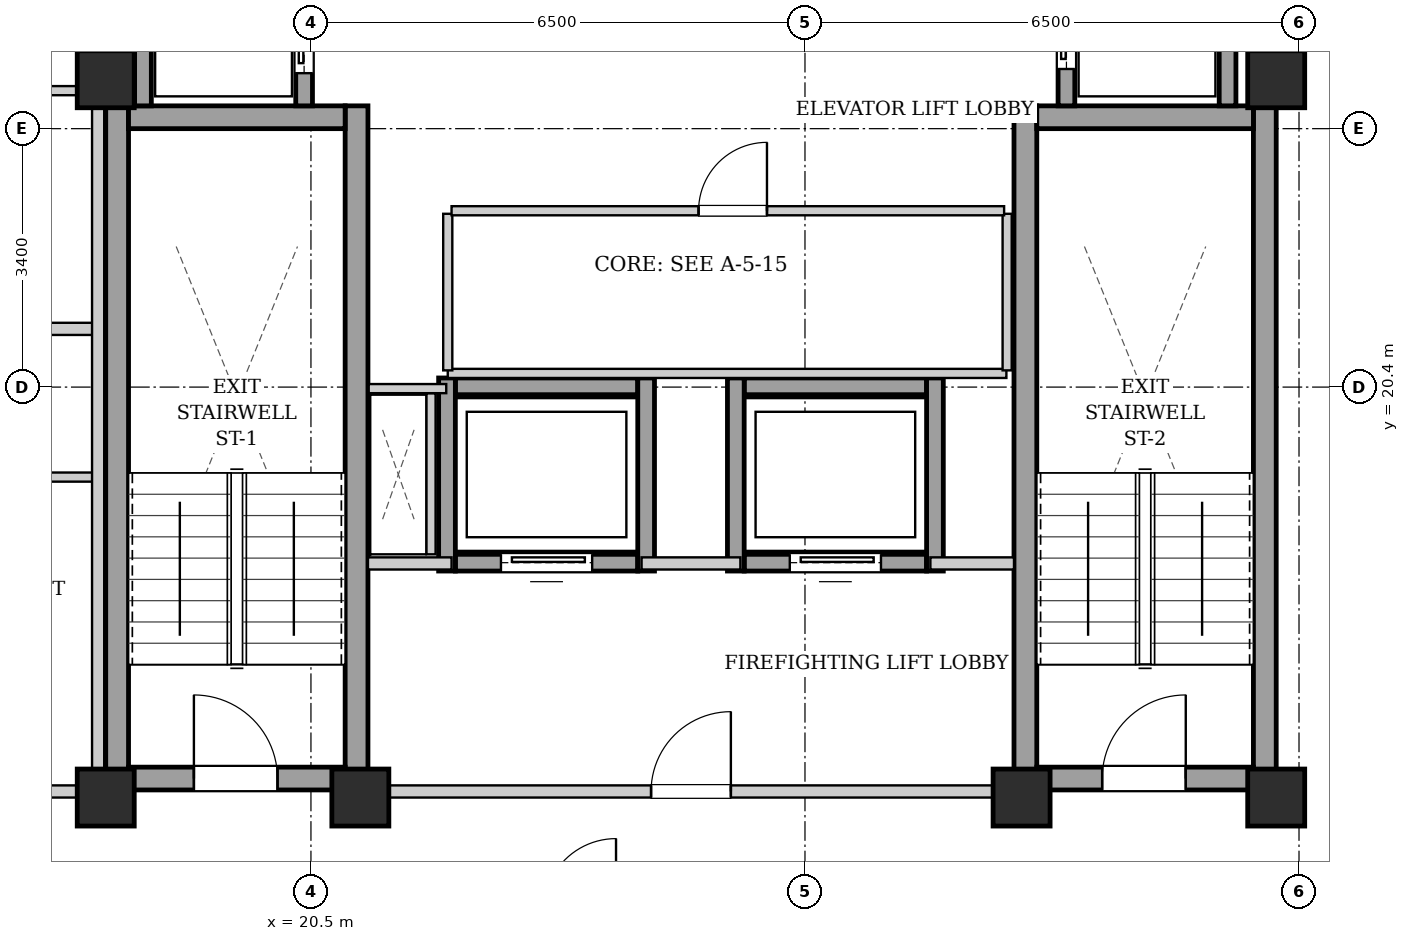
"""IFC4 building model, lengths in metres.
Left out: names, types, materials, properties, quantities, classifications, styles, units other than length and angle.
Written with IfcOpenShell. Run it as: python <this file> out.ifc"""

import sys

from ifc_helpers import new_model, si_unit, direction, frame, frame_2d, origin, origin_2d, place, context, subcontext, project, spatial, rectangle, extrude, element, fill, save


model = new_model("IFC4")
c1 = context("Model", 3, precision=1e-05, world=origin(), true_north=direction((0.0, 1.0)))
c2 = subcontext(c1, "Body", "Model", "MODEL_VIEW")
j1 = project(units=[si_unit("LENGTHUNIT", "METRE"), si_unit("PLANEANGLEUNIT", "RADIAN")], contexts=[c1])
p1 = place(None, origin())
s1 = spatial("IfcSite", under=j1, at=p1, CompositionType="ELEMENT")
p2 = place(p1, origin())
s2 = spatial("IfcBuilding", under=s1, at=p2, CompositionType="ELEMENT")
p3 = place(p2, frame((0.0, 0.0, 244.5)))
s3 = spatial("IfcBuildingStorey", under=s2, at=p3, CompositionType="ELEMENT", Elevation=244.5)
for number, where, z_axis, x_axis in (
    (1, (17.8, 15.0, 0.0), (0.0, 0.0, 1.0), (1.0, 0.0, 0.0)),
    (2, (21.15, 15.0, 0.0), (0.0, 0.0, 1.0), (1.0, 0.0, 0.0)),
    (3, (29.85, 15.0, 0.0), (0.0, 0.0, 1.0), (1.0, 0.0, 0.0)),
    (4, (33.2, 15.0, 0.0), (0.0, 0.0, 1.0), (1.0, 0.0, 0.0)),
    (5, (17.8, 24.45, 0.0), (0.0, 0.0, 1.0), (1.0, 0.0, 0.0)),
    (6, (33.2, 24.45, 0.0), (0.0, 0.0, 1.0), (1.0, 0.0, 0.0)),
):
    element("IfcColumn", number, at=place(p3, frame(where, z_axis=z_axis, x_axis=x_axis)), inside=s3, PredefinedType="COLUMN", context=c2, shape_type="SweptSolid", body=[
        extrude(rectangle(XDim=0.75, YDim=0.75, at=origin_2d()), origin(), (0.0, 0.0, 1.0), 3.4),
    ])
for number, where, z_axis, x_axis in (
    (7, (17.95, 15.1, 0.0), (0.0, 0.0, 1.0), (0.0, 1.0, 0.0)),
    (8, (21.1, 15.1, 0.0), (0.0, 0.0, 1.0), (0.0, 1.0, 0.0)),
):
    element("IfcWall", number, at=place(p3, frame(where, z_axis=z_axis, x_axis=x_axis)), inside=s3, PredefinedType="SHEAR", context=c2, shape_type="SweptSolid", body=[
        extrude(rectangle(XDim=9.0, YDim=0.3, at=frame_2d((4.5, 0.0))), origin(), (0.0, 0.0, 1.0), 3.14),
    ])
p4 = place(p3, frame((18.1, 23.95, 0.0), z_axis=(0.0, 0.0, 1.0), x_axis=(1.0, 0.0, 0.0)))
e9 = element("IfcWall", 9, at=p4, inside=s3, PredefinedType="SHEAR", context=c2, shape_type="SweptSolid", body=[
    extrude(rectangle(XDim=2.85, YDim=0.3, at=frame_2d((1.425, 0.0))), origin(), (0.0, 0.0, 1.0), 3.14),
])
p5 = place(p3, frame((18.1, 15.25, 0.0), z_axis=(0.0, 0.0, 1.0), x_axis=(1.0, 0.0, 0.0)))
e10 = element("IfcWall", 10, at=p5, inside=s3, PredefinedType="SHEAR", context=c2, shape_type="SweptSolid", body=[
    extrude(rectangle(XDim=2.85, YDim=0.3, at=frame_2d((1.425, 0.0))), origin(), (0.0, 0.0, 1.0), 3.14),
])
p6 = place(p5, frame((0.86, 0.0, 0.0)))
e11 = element("IfcOpeningElement", 11, at=p6, cuts=e10, PredefinedType="OPENING", context=c2, shape_type="SweptSolid", body=[
    extrude(rectangle(XDim=1.1, YDim=2.05, at=frame_2d((0.55, 1.025))), frame((0.0, 0.16, 0.0), z_axis=(0.0, -1.0, 0.0), x_axis=(1.0, 0.0, 0.0)), (0.0, 0.0, 1.0), 0.32),
])
for number, where, z_axis, x_axis in (
    (12, (29.9, 15.1, 0.0), (0.0, 0.0, 1.0), (0.0, 1.0, 0.0)),
    (13, (33.05, 15.1, 0.0), (0.0, 0.0, 1.0), (0.0, 1.0, 0.0)),
):
    element("IfcWall", number, at=place(p3, frame(where, z_axis=z_axis, x_axis=x_axis)), inside=s3, PredefinedType="SHEAR", context=c2, shape_type="SweptSolid", body=[
        extrude(rectangle(XDim=9.0, YDim=0.3, at=frame_2d((4.5, 0.0))), origin(), (0.0, 0.0, 1.0), 3.14),
    ])
p7 = place(p3, frame((30.05, 23.95, 0.0), z_axis=(0.0, 0.0, 1.0), x_axis=(1.0, 0.0, 0.0)))
e14 = element("IfcWall", 14, at=p7, inside=s3, PredefinedType="SHEAR", context=c2, shape_type="SweptSolid", body=[
    extrude(rectangle(XDim=2.85, YDim=0.3, at=frame_2d((1.425, 0.0))), origin(), (0.0, 0.0, 1.0), 3.14),
])
p8 = place(p3, frame((30.05, 15.25, 0.0), z_axis=(0.0, 0.0, 1.0), x_axis=(1.0, 0.0, 0.0)))
e15 = element("IfcWall", 15, at=p8, inside=s3, PredefinedType="SHEAR", context=c2, shape_type="SweptSolid", body=[
    extrude(rectangle(XDim=2.85, YDim=0.3, at=frame_2d((1.425, 0.0))), origin(), (0.0, 0.0, 1.0), 3.14),
])
p9 = place(p8, frame((0.86, 0.0, 0.0)))
e16 = element("IfcOpeningElement", 16, at=p9, cuts=e15, PredefinedType="OPENING", context=c2, shape_type="SweptSolid", body=[
    extrude(rectangle(XDim=1.1, YDim=2.05, at=frame_2d((0.55, 1.025))), frame((0.0, 0.16, 0.0), z_axis=(0.0, -1.0, 0.0), x_axis=(1.0, 0.0, 0.0)), (0.0, 0.0, 1.0), 0.32),
])
p10 = place(p3, frame((18.29, 24.1, 0.0), z_axis=(0.0, 0.0, 1.0), x_axis=(0.0, 1.0, 0.0)))
e17 = element("IfcWall", 17, at=p10, inside=s3, PredefinedType="SHEAR", context=c2, shape_type="SweptSolid", body=[
    extrude(rectangle(XDim=4.14, YDim=0.22, at=frame_2d((2.07, 0.0))), origin(), (0.0, 0.0, 1.0), 3.14),
])
p11 = place(p3, frame((20.41, 24.1, 0.0), z_axis=(0.0, 0.0, 1.0), x_axis=(0.0, 1.0, 0.0)))
e18 = element("IfcWall", 18, at=p11, inside=s3, PredefinedType="SHEAR", context=c2, shape_type="SweptSolid", body=[
    extrude(rectangle(XDim=1.96, YDim=0.22, at=frame_2d((0.98, 0.0))), origin(), (0.0, 0.0, 1.0), 3.14),
])
p12 = place(p11, frame((0.43, 0.0, 0.0)))
e19 = element("IfcOpeningElement", 19, at=p12, cuts=e18, PredefinedType="OPENING", context=c2, shape_type="SweptSolid", body=[
    extrude(rectangle(XDim=1.1, YDim=2.15, at=frame_2d((0.55, 1.075))), frame((0.0, 0.12, 0.0), z_axis=(0.0, -1.0, 0.0), x_axis=(1.0, 0.0, 0.0)), (0.0, 0.0, 1.0), 0.24),
])
p13 = place(p3, frame((30.44, 24.1, 0.0), z_axis=(0.0, 0.0, 1.0), x_axis=(0.0, 1.0, 0.0)))
e20 = element("IfcWall", 20, at=p13, inside=s3, PredefinedType="SHEAR", context=c2, shape_type="SweptSolid", body=[
    extrude(rectangle(XDim=2.07, YDim=0.22, at=frame_2d((1.035, 0.0))), origin(), (0.0, 0.0, 1.0), 3.14),
])
p14 = place(p13, frame((0.485, 0.0, 0.0)))
e21 = element("IfcOpeningElement", 21, at=p14, cuts=e20, PredefinedType="OPENING", context=c2, shape_type="SweptSolid", body=[
    extrude(rectangle(XDim=1.1, YDim=2.15, at=frame_2d((0.55, 1.075))), frame((0.0, 0.12, 0.0), z_axis=(0.0, -1.0, 0.0), x_axis=(1.0, 0.0, 0.0)), (0.0, 0.0, 1.0), 0.24),
])
p15 = place(p3, frame((32.56, 24.1, 0.0), z_axis=(0.0, 0.0, 1.0), x_axis=(0.0, 1.0, 0.0)))
e22 = element("IfcWall", 22, at=p15, inside=s3, PredefinedType="SHEAR", context=c2, shape_type="SweptSolid", body=[
    extrude(rectangle(XDim=2.07, YDim=0.22, at=frame_2d((1.035, 0.0))), origin(), (0.0, 0.0, 1.0), 3.14),
])
p16 = place(p3, frame((22.4, 18.09, 0.0), z_axis=(0.0, 0.0, 1.0), x_axis=(1.0, 0.0, 0.0)))
e23 = element("IfcWall", 23, at=p16, inside=s3, PredefinedType="SHEAR", context=c2, shape_type="SweptSolid", body=[
    extrude(rectangle(XDim=2.4, YDim=0.22, at=frame_2d((1.2, 0.0))), origin(), (0.0, 0.0, 1.0), 3.14),
])
p17 = place(p16, frame((0.6, 0.0, 0.0)))
e24 = element("IfcOpeningElement", 24, at=p17, cuts=e23, PredefinedType="OPENING", context=c2, shape_type="SweptSolid", body=[
    extrude(rectangle(XDim=1.2, YDim=2.15, at=frame_2d((0.6, 1.075))), frame((0.0, 0.12, 0.0), z_axis=(0.0, -1.0, 0.0), x_axis=(1.0, 0.0, 0.0)), (0.0, 0.0, 1.0), 0.24),
])
p18 = place(p3, frame((22.4, 20.41, 0.0), z_axis=(0.0, 0.0, 1.0), x_axis=(1.0, 0.0, 0.0)))
e25 = element("IfcWall", 25, at=p18, inside=s3, PredefinedType="SHEAR", context=c2, shape_type="SweptSolid", body=[
    extrude(rectangle(XDim=2.4, YDim=0.22, at=frame_2d((1.2, 0.0))), origin(), (0.0, 0.0, 1.0), 3.14),
])
for number, where, z_axis, x_axis in (
    (26, (22.29, 17.98, 0.0), (0.0, 0.0, 1.0), (0.0, 1.0, 0.0)),
    (27, (24.91, 17.98, 0.0), (0.0, 0.0, 1.0), (0.0, 1.0, 0.0)),
):
    element("IfcWall", number, at=place(p3, frame(where, z_axis=z_axis, x_axis=x_axis)), inside=s3, PredefinedType="SHEAR", context=c2, shape_type="SweptSolid", body=[
        extrude(rectangle(XDim=2.54, YDim=0.22, at=frame_2d((1.27, 0.0))), origin(), (0.0, 0.0, 1.0), 3.14),
    ])
p19 = place(p3, frame((26.2, 18.09, 0.0), z_axis=(0.0, 0.0, 1.0), x_axis=(1.0, 0.0, 0.0)))
e28 = element("IfcWall", 28, at=p19, inside=s3, PredefinedType="SHEAR", context=c2, shape_type="SweptSolid", body=[
    extrude(rectangle(XDim=2.4, YDim=0.22, at=frame_2d((1.2, 0.0))), origin(), (0.0, 0.0, 1.0), 3.14),
])
p20 = place(p19, frame((0.6, 0.0, 0.0)))
e29 = element("IfcOpeningElement", 29, at=p20, cuts=e28, PredefinedType="OPENING", context=c2, shape_type="SweptSolid", body=[
    extrude(rectangle(XDim=1.2, YDim=2.15, at=frame_2d((0.6, 1.075))), frame((0.0, 0.12, 0.0), z_axis=(0.0, -1.0, 0.0), x_axis=(1.0, 0.0, 0.0)), (0.0, 0.0, 1.0), 0.24),
])
p21 = place(p3, frame((26.2, 20.41, 0.0), z_axis=(0.0, 0.0, 1.0), x_axis=(1.0, 0.0, 0.0)))
e30 = element("IfcWall", 30, at=p21, inside=s3, PredefinedType="SHEAR", context=c2, shape_type="SweptSolid", body=[
    extrude(rectangle(XDim=2.4, YDim=0.22, at=frame_2d((1.2, 0.0))), origin(), (0.0, 0.0, 1.0), 3.14),
])
for number, where, z_axis, x_axis in (
    (31, (26.09, 17.98, 0.0), (0.0, 0.0, 1.0), (0.0, 1.0, 0.0)),
    (32, (28.71, 17.98, 0.0), (0.0, 0.0, 1.0), (0.0, 1.0, 0.0)),
):
    element("IfcWall", number, at=place(p3, frame(where, z_axis=z_axis, x_axis=x_axis)), inside=s3, PredefinedType="SHEAR", context=c2, shape_type="SweptSolid", body=[
        extrude(rectangle(XDim=2.54, YDim=0.22, at=frame_2d((1.27, 0.0))), origin(), (0.0, 0.0, 1.0), 3.14),
    ])
p22 = place(p3, frame((21.25, 15.08, 0.0), z_axis=(0.0, 0.0, 1.0), x_axis=(1.0, 0.0, 0.0)))
e33 = element("IfcWall", 33, at=p22, inside=s3, PredefinedType="PARTITIONING", context=c2, shape_type="SweptSolid", body=[
    extrude(rectangle(XDim=8.5, YDim=0.16, at=frame_2d((4.25, 0.0))), origin(), (0.0, 0.0, 1.0), 2.668),
])
p23 = place(p22, frame((3.725, 0.0, 0.0)))
e34 = element("IfcOpeningElement", 34, at=p23, cuts=e33, PredefinedType="OPENING", context=c2, shape_type="SweptSolid", body=[
    extrude(rectangle(XDim=1.05, YDim=2.05, at=frame_2d((0.525, 1.025))), frame((0.0, 0.09, 0.0), z_axis=(0.0, -1.0, 0.0), x_axis=(1.0, 0.0, 0.0)), (0.0, 0.0, 1.0), 0.18),
])
p24 = place(p3, frame((21.25, 18.08, 0.0), z_axis=(0.0, 0.0, 1.0), x_axis=(1.0, 0.0, 0.0)))
e35 = element("IfcWall", 35, at=p24, inside=s3, PredefinedType="PARTITIONING", context=c2, shape_type="SweptSolid", body=[
    extrude(rectangle(XDim=1.1, YDim=0.16, at=frame_2d((0.55, 0.0))), origin(), (0.0, 0.0, 1.0), 3.14),
])
p25 = place(p3, frame((24.85, 18.08, 0.0), z_axis=(0.0, 0.0, 1.0), x_axis=(1.0, 0.0, 0.0)))
e36 = element("IfcWall", 36, at=p25, inside=s3, PredefinedType="PARTITIONING", context=c2, shape_type="SweptSolid", body=[
    extrude(rectangle(XDim=1.3, YDim=0.16, at=frame_2d((0.65, 0.0))), origin(), (0.0, 0.0, 1.0), 3.14),
])
p26 = place(p3, frame((28.65, 18.08, 0.0), z_axis=(0.0, 0.0, 1.0), x_axis=(1.0, 0.0, 0.0)))
e37 = element("IfcWall", 37, at=p26, inside=s3, PredefinedType="PARTITIONING", context=c2, shape_type="SweptSolid", body=[
    extrude(rectangle(XDim=1.1, YDim=0.16, at=frame_2d((0.55, 0.0))), origin(), (0.0, 0.0, 1.0), 3.14),
])
for number, where, z_axis, x_axis in (
    (38, (17.88, 24.12, 0.0), (0.0, 0.0, 1.0), (0.0, 1.0, 0.0)),
    (39, (33.12, 24.12, 0.0), (0.0, 0.0, 1.0), (0.0, 1.0, 0.0)),
):
    element("IfcWall", number, at=place(p3, frame(where, z_axis=z_axis, x_axis=x_axis)), inside=s3, PredefinedType="PARTITIONING", context=c2, shape_type="SweptSolid", body=[
        extrude(rectangle(XDim=4.76, YDim=0.16, at=frame_2d((2.38, 0.0))), origin(), (0.0, 0.0, 1.0), 3.14),
    ])
p27 = place(p3, frame((22.08, 18.2, 0.0), z_axis=(0.0, 0.0, 1.0), x_axis=(0.0, 1.0, 0.0)))
e40 = element("IfcWall", 40, at=p27, inside=s3, PredefinedType="PARTITIONING", context=c2, shape_type="SweptSolid", body=[
    extrude(rectangle(XDim=2.12, YDim=0.12, at=frame_2d((1.06, 0.0))), origin(), (0.0, 0.0, 1.0), 3.14),
])
p28 = place(p3, frame((22.28, 20.38, 0.0), z_axis=(0.0, 0.0, 1.0), x_axis=(-1.0, 0.0, 0.0)))
e41 = element("IfcWall", 41, at=p28, inside=s3, PredefinedType="PARTITIONING", context=c2, shape_type="SweptSolid", body=[
    extrude(rectangle(XDim=1.02, YDim=0.12, at=frame_2d((0.51, 0.0))), origin(), (0.0, 0.0, 1.0), 3.14),
])
p29 = place(p3, frame((22.3, 20.58, 0.0), z_axis=(0.0, 0.0, 1.0), x_axis=(1.0, 0.0, 0.0)))
e42 = element("IfcWall", 42, at=p29, inside=s3, PredefinedType="PARTITIONING", context=c2, shape_type="SweptSolid", body=[
    extrude(rectangle(XDim=7.35, YDim=0.12, at=frame_2d((3.675, 0.0))), origin(), (0.0, 0.0, 1.0), 3.14),
])
for number, where, z_axis, x_axis in (
    (43, (22.3, 20.62, 0.0), (0.0, 0.0, 1.0), (0.0, 1.0, 0.0)),
    (44, (29.66, 20.62, 0.0), (0.0, 0.0, 1.0), (0.0, 1.0, 0.0)),
):
    element("IfcWall", number, at=place(p3, frame(where, z_axis=z_axis, x_axis=x_axis)), inside=s3, PredefinedType="PARTITIONING", context=c2, shape_type="SweptSolid", body=[
        extrude(rectangle(XDim=2.06, YDim=0.12, at=frame_2d((1.03, 0.0))), origin(), (0.0, 0.0, 1.0), 3.14),
    ])
p30 = place(p3, frame((22.35, 22.72, 0.0), z_axis=(0.0, 0.0, 1.0), x_axis=(1.0, 0.0, 0.0)))
e45 = element("IfcWall", 45, at=p30, inside=s3, PredefinedType="PARTITIONING", context=c2, shape_type="SweptSolid", body=[
    extrude(rectangle(XDim=7.27, YDim=0.12, at=frame_2d((3.635, 0.0))), origin(), (0.0, 0.0, 1.0), 3.14),
])
p31 = place(p30, frame((3.25, 0.0, 0.0)))
e46 = element("IfcOpeningElement", 46, at=p31, cuts=e45, PredefinedType="OPENING", context=c2, shape_type="SweptSolid", body=[
    extrude(rectangle(XDim=0.9, YDim=2.05, at=frame_2d((0.45, 1.025))), frame((0.0, 0.07, 0.0), z_axis=(0.0, -1.0, 0.0), x_axis=(1.0, 0.0, 0.0)), (0.0, 0.0, 1.0), 0.14),
])
p32 = place(p3, frame((10.88, 15.08, 0.0), z_axis=(0.0, 0.0, 1.0), x_axis=(1.0, 0.0, 0.0)))
e47 = element("IfcWall", 47, at=p32, inside=s3, PredefinedType="PARTITIONING", context=c2, shape_type="SweptSolid", body=[
    extrude(rectangle(XDim=6.88, YDim=0.16, at=frame_2d((3.44, 0.0))), origin(), (0.0, 0.0, 1.0), 2.668),
])
p33 = place(p32, frame((5.06, 0.0, 0.0)))
e48 = element("IfcOpeningElement", 48, at=p33, cuts=e47, PredefinedType="OPENING", context=c2, shape_type="SweptSolid", body=[
    extrude(rectangle(XDim=0.95, YDim=2.1, at=frame_2d((0.475, 1.05))), frame((0.0, 0.09, 0.0), z_axis=(0.0, -1.0, 0.0), x_axis=(1.0, 0.0, 0.0)), (0.0, 0.0, 1.0), 0.18),
])
p34 = place(p3, frame((10.88, 21.166, 0.0), z_axis=(0.0, 0.0, 1.0), x_axis=(1.0, 0.0, 0.0)))
e49 = element("IfcWall", 49, at=p34, inside=s3, PredefinedType="PARTITIONING", context=c2, shape_type="SweptSolid", body=[
    extrude(rectangle(XDim=6.76, YDim=0.16, at=frame_2d((3.38, 0.0))), origin(), (0.0, 0.0, 1.0), 3.14),
])
p35 = place(p3, frame((15.19, 19.216, 0.0), z_axis=(0.0, 0.0, 1.0), x_axis=(1.0, 0.0, 0.0)))
e50 = element("IfcWall", 50, at=p35, inside=s3, PredefinedType="PARTITIONING", context=c2, shape_type="SweptSolid", body=[
    extrude(rectangle(XDim=2.45, YDim=0.12, at=frame_2d((1.225, 0.0))), origin(), (0.0, 0.0, 1.0), 3.14),
])
p36 = place(p35, frame((0.795, 0.0, 0.0)))
e51 = element("IfcOpeningElement", 51, at=p36, cuts=e50, PredefinedType="OPENING", context=c2, shape_type="SweptSolid", body=[
    extrude(rectangle(XDim=0.86, YDim=2.05, at=frame_2d((0.43, 1.025))), frame((0.0, 0.07, 0.0), z_axis=(0.0, -1.0, 0.0), x_axis=(1.0, 0.0, 0.0)), (0.0, 0.0, 1.0), 0.14),
])
p37 = place(p3, frame((15.19, 24.3, 0.0), z_axis=(0.0, 0.0, 1.0), x_axis=(1.0, 0.0, 0.0)))
e52 = element("IfcWall", 52, at=p37, inside=s3, PredefinedType="PARTITIONING", context=c2, shape_type="SweptSolid", body=[
    extrude(rectangle(XDim=2.45, YDim=0.12, at=frame_2d((1.225, 0.0))), origin(), (0.0, 0.0, 1.0), 3.14),
])
p38 = place(p37, frame((0.795, 0.0, 0.0)))
e53 = element("IfcOpeningElement", 53, at=p38, cuts=e52, PredefinedType="OPENING", context=c2, shape_type="SweptSolid", body=[
    extrude(rectangle(XDim=0.86, YDim=2.05, at=frame_2d((0.43, 1.025))), frame((0.0, 0.07, 0.0), z_axis=(0.0, -1.0, 0.0), x_axis=(1.0, 0.0, 0.0)), (0.0, 0.0, 1.0), 0.14),
])
p39 = place(p3, frame((17.7, 15.02, 0.0), z_axis=(0.0, 0.0, 1.0), x_axis=(0.0, 1.0, 0.0)))
e54 = element("IfcWall", 54, at=p39, inside=s3, PredefinedType="PARTITIONING", context=c2, shape_type="SweptSolid", body=[
    extrude(rectangle(XDim=13.98, YDim=0.16, at=frame_2d((6.99, 0.0))), origin(), (0.0, 0.0, 1.0), 3.14),
])
p40 = place(p6, origin())
e55 = element("IfcDoor", 55, at=p40, inside=s3, OperationType="SINGLE_SWING_LEFT", PredefinedType="DOOR", context=c2, shape_type="SweptSolid", body=[
    extrude(rectangle(XDim=1.1, YDim=2.05, at=frame_2d((0.55, 1.025))), frame((0.0, 0.025, 0.0), z_axis=(0.0, -1.0, 0.0), x_axis=(1.0, 0.0, 0.0)), (0.0, 0.0, 1.0), 0.05),
])
fill(e11, e55)
p41 = place(p9, origin())
e56 = element("IfcDoor", 56, at=p41, inside=s3, OperationType="SINGLE_SWING_RIGHT", PredefinedType="DOOR", context=c2, shape_type="SweptSolid", body=[
    extrude(rectangle(XDim=1.1, YDim=2.05, at=frame_2d((0.55, 1.025))), frame((0.0, 0.025, 0.0), z_axis=(0.0, -1.0, 0.0), x_axis=(1.0, 0.0, 0.0)), (0.0, 0.0, 1.0), 0.05),
])
fill(e16, e56)
p42 = place(p12, origin())
e57 = element("IfcDoor", 57, at=p42, inside=s3, OperationType="SLIDING_TO_LEFT", PredefinedType="DOOR", context=c2, shape_type="SweptSolid", body=[
    extrude(rectangle(XDim=1.1, YDim=2.15, at=frame_2d((0.55, 1.075))), frame((0.0, 0.025, 0.0), z_axis=(0.0, -1.0, 0.0), x_axis=(1.0, 0.0, 0.0)), (0.0, 0.0, 1.0), 0.05),
])
fill(e19, e57)
p43 = place(p14, origin())
e58 = element("IfcDoor", 58, at=p43, inside=s3, OperationType="SLIDING_TO_LEFT", PredefinedType="DOOR", context=c2, shape_type="SweptSolid", body=[
    extrude(rectangle(XDim=1.1, YDim=2.15, at=frame_2d((0.55, 1.075))), frame((0.0, 0.025, 0.0), z_axis=(0.0, -1.0, 0.0), x_axis=(1.0, 0.0, 0.0)), (0.0, 0.0, 1.0), 0.05),
])
fill(e21, e58)
p44 = place(p17, origin())
e59 = element("IfcDoor", 59, at=p44, inside=s3, OperationType="SLIDING_TO_LEFT", PredefinedType="DOOR", context=c2, shape_type="SweptSolid", body=[
    extrude(rectangle(XDim=1.2, YDim=2.15, at=frame_2d((0.6, 1.075))), frame((0.0, 0.025, 0.0), z_axis=(0.0, -1.0, 0.0), x_axis=(1.0, 0.0, 0.0)), (0.0, 0.0, 1.0), 0.05),
])
fill(e24, e59)
p45 = place(p20, origin())
e60 = element("IfcDoor", 60, at=p45, inside=s3, OperationType="SLIDING_TO_LEFT", PredefinedType="DOOR", context=c2, shape_type="SweptSolid", body=[
    extrude(rectangle(XDim=1.2, YDim=2.15, at=frame_2d((0.6, 1.075))), frame((0.0, 0.025, 0.0), z_axis=(0.0, -1.0, 0.0), x_axis=(1.0, 0.0, 0.0)), (0.0, 0.0, 1.0), 0.05),
])
fill(e29, e60)
p46 = place(p23, origin())
e61 = element("IfcDoor", 61, at=p46, inside=s3, OperationType="SINGLE_SWING_RIGHT", PredefinedType="DOOR", context=c2, shape_type="SweptSolid", body=[
    extrude(rectangle(XDim=1.05, YDim=2.05, at=frame_2d((0.525, 1.025))), frame((0.0, 0.025, 0.0), z_axis=(0.0, -1.0, 0.0), x_axis=(1.0, 0.0, 0.0)), (0.0, 0.0, 1.0), 0.05),
])
fill(e34, e61)
p47 = place(p31, origin())
e62 = element("IfcDoor", 62, at=p47, inside=s3, OperationType="SINGLE_SWING_RIGHT", PredefinedType="DOOR", context=c2, shape_type="SweptSolid", body=[
    extrude(rectangle(XDim=0.9, YDim=2.05, at=frame_2d((0.45, 1.025))), frame((0.0, 0.025, 0.0), z_axis=(0.0, -1.0, 0.0), x_axis=(1.0, 0.0, 0.0)), (0.0, 0.0, 1.0), 0.05),
])
fill(e46, e62)
save(model, sys.argv[1])
